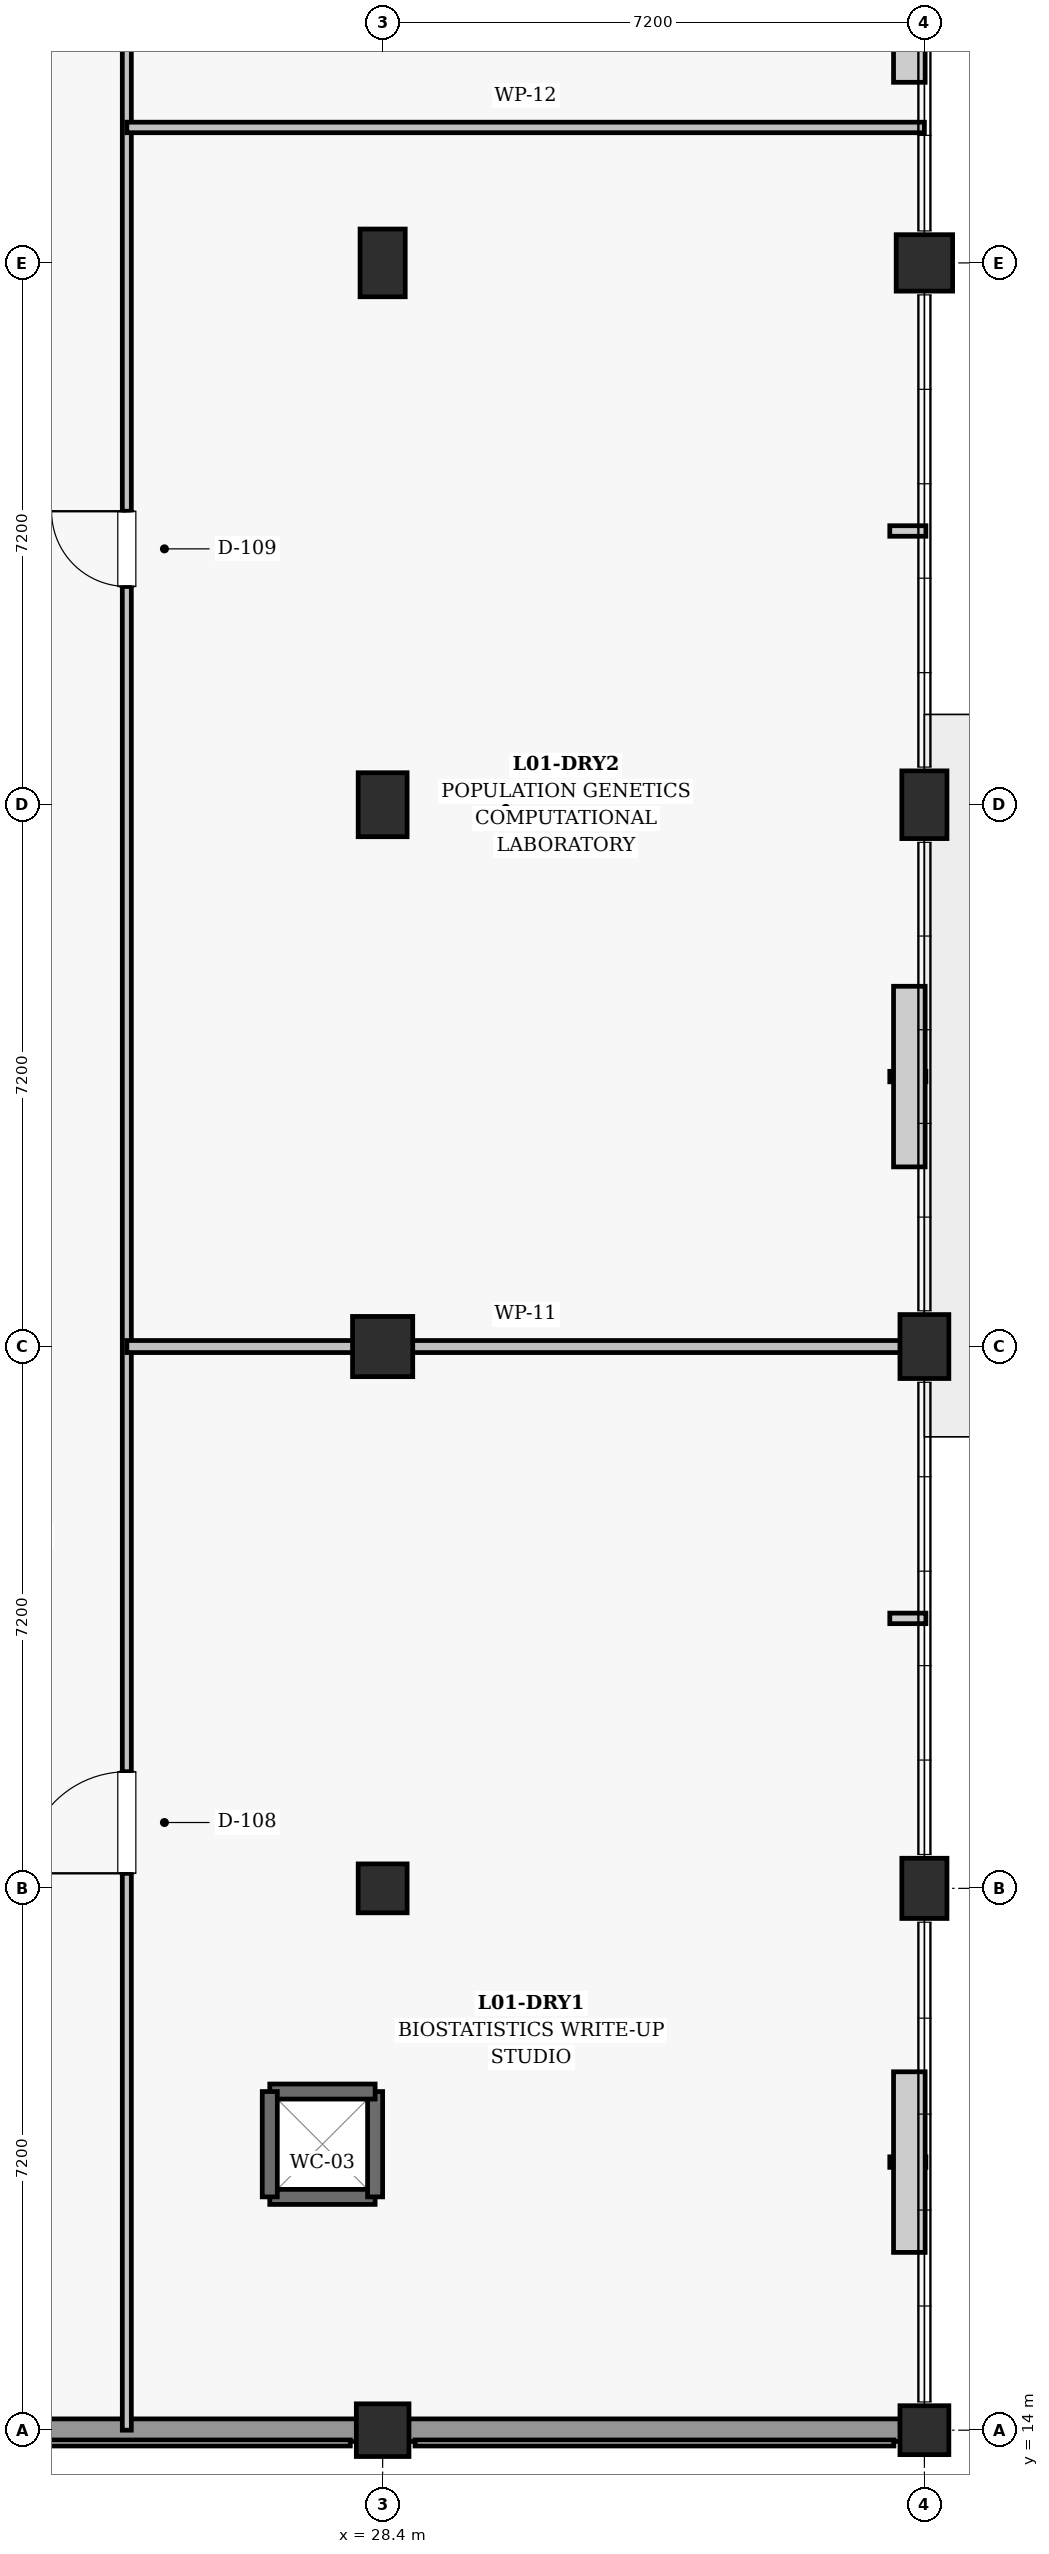
"""IFC4 building model, lengths in metres.
Left out: names, types, materials, properties, quantities, classifications, styles, units other than length and angle.
Written with IfcOpenShell. Run it as: python <this file> out.ifc"""

import sys

from ifc_helpers import new_model, si_unit, direction, frame, frame_2d, origin, origin_2d, place, context, subcontext, project, spatial, rectangle, extrude, element, fill, save


model = new_model("IFC4")
c1 = context("Model", 3, precision=1e-05, world=origin(), true_north=direction((0.0, 1.0)))
c2 = subcontext(c1, "Body", "Model", "MODEL_VIEW")
j1 = project(units=[si_unit("LENGTHUNIT", "METRE"), si_unit("PLANEANGLEUNIT", "RADIAN")], contexts=[c1])
p1 = place(None, origin())
s1 = spatial("IfcSite", under=j1, at=p1, CompositionType="ELEMENT")
p2 = place(p1, origin())
s2 = spatial("IfcBuilding", under=s1, at=p2, CompositionType="ELEMENT")
p3 = place(p2, frame((0.0, 0.0, 5.4)))
s3 = spatial("IfcBuildingStorey", under=s2, at=p3, CompositionType="ELEMENT", Elevation=5.4)
p4 = place(p3, frame((28.4, 14.0, 0.0), z_axis=(0.0, 0.0, 1.0), x_axis=(1.0, 0.0, 0.0)))
e1 = element("IfcColumn", 1, at=p4, inside=s3, PredefinedType="COLUMN", context=c2, shape_type="SweptSolid", body=[
    extrude(rectangle(XDim=0.7, YDim=0.7, at=origin_2d()), origin(), (0.0, 0.0, 1.0), 4.5),
])
p5 = place(p3, frame((28.4, 21.2, 0.0), z_axis=(0.0, 0.0, 1.0), x_axis=(1.0, 0.0, 0.0)))
e2 = element("IfcColumn", 2, at=p5, inside=s3, PredefinedType="COLUMN", context=c2, shape_type="SweptSolid", body=[
    extrude(rectangle(XDim=0.65, YDim=0.65, at=origin_2d()), origin(), (0.0, 0.0, 1.0), 4.5),
])
p6 = place(p3, frame((28.4, 28.4, 0.0), z_axis=(0.0, 0.0, 1.0), x_axis=(1.0, 0.0, 0.0)))
e3 = element("IfcColumn", 3, at=p6, inside=s3, PredefinedType="COLUMN", context=c2, shape_type="SweptSolid", body=[
    extrude(rectangle(XDim=0.8, YDim=0.8, at=origin_2d()), origin(), (0.0, 0.0, 1.0), 4.5),
])
p7 = place(p3, frame((28.4, 35.6, 0.0), z_axis=(0.0, 0.0, 1.0), x_axis=(1.0, 0.0, 0.0)))
e4 = element("IfcColumn", 4, at=p7, inside=s3, PredefinedType="COLUMN", context=c2, shape_type="SweptSolid", body=[
    extrude(rectangle(XDim=0.65, YDim=0.85, at=origin_2d()), origin(), (0.0, 0.0, 1.0), 4.5),
])
p8 = place(p3, frame((28.4, 42.8, 0.0), z_axis=(0.0, 0.0, 1.0), x_axis=(1.0, 0.0, 0.0)))
e5 = element("IfcColumn", 5, at=p8, inside=s3, PredefinedType="COLUMN", context=c2, shape_type="SweptSolid", body=[
    extrude(rectangle(XDim=0.6, YDim=0.9, at=origin_2d()), origin(), (0.0, 0.0, 1.0), 4.5),
])
p9 = place(p3, frame((35.6, 14.0, 0.0), z_axis=(0.0, 0.0, 1.0), x_axis=(1.0, 0.0, 0.0)))
e6 = element("IfcColumn", 6, at=p9, inside=s3, PredefinedType="COLUMN", context=c2, shape_type="SweptSolid", body=[
    extrude(rectangle(XDim=0.65, YDim=0.65, at=origin_2d()), origin(), (0.0, 0.0, 1.0), 4.5),
])
p10 = place(p3, frame((35.6, 21.2, 0.0), z_axis=(0.0, 0.0, 1.0), x_axis=(1.0, 0.0, 0.0)))
e7 = element("IfcColumn", 7, at=p10, inside=s3, PredefinedType="COLUMN", context=c2, shape_type="SweptSolid", body=[
    extrude(rectangle(XDim=0.6, YDim=0.8, at=origin_2d()), origin(), (0.0, 0.0, 1.0), 4.5),
])
p11 = place(p3, frame((35.6, 28.4, 0.0), z_axis=(0.0, 0.0, 1.0), x_axis=(1.0, 0.0, 0.0)))
e8 = element("IfcColumn", 8, at=p11, inside=s3, PredefinedType="COLUMN", context=c2, shape_type="SweptSolid", body=[
    extrude(rectangle(XDim=0.65, YDim=0.85, at=origin_2d()), origin(), (0.0, 0.0, 1.0), 4.5),
])
p12 = place(p3, frame((35.6, 35.6, 0.0), z_axis=(0.0, 0.0, 1.0), x_axis=(1.0, 0.0, 0.0)))
e9 = element("IfcColumn", 9, at=p12, inside=s3, PredefinedType="COLUMN", context=c2, shape_type="SweptSolid", body=[
    extrude(rectangle(XDim=0.6, YDim=0.9, at=origin_2d()), origin(), (0.0, 0.0, 1.0), 4.5),
])
p13 = place(p3, frame((35.6, 42.8, 0.0), z_axis=(0.0, 0.0, 1.0), x_axis=(1.0, 0.0, 0.0)))
e10 = element("IfcColumn", 10, at=p13, inside=s3, PredefinedType="COLUMN", context=c2, shape_type="SweptSolid", body=[
    extrude(rectangle(XDim=0.75, YDim=0.75, at=origin_2d()), origin(), (0.0, 0.0, 1.0), 4.5),
])
p14 = place(p3, frame((21.48, 14.0, 0.0), z_axis=(0.0, 0.0, 1.0), x_axis=(1.0, 0.0, 0.0)))
e11 = element("IfcWall", 11, at=p14, inside=s3, PredefinedType="SOLIDWALL", context=c2, shape_type="SweptSolid", body=[
    extrude(rectangle(XDim=6.59, YDim=0.3, at=frame_2d((3.295, 0.0))), origin(), (0.0, 0.0, 1.0), 3.475),
])
p15 = place(p3, frame((28.73, 14.0, 0.0), z_axis=(0.0, 0.0, 1.0), x_axis=(1.0, 0.0, 0.0)))
e12 = element("IfcWall", 12, at=p15, inside=s3, PredefinedType="SOLIDWALL", context=c2, shape_type="SweptSolid", body=[
    extrude(rectangle(XDim=6.565, YDim=0.3, at=frame_2d((3.282, 0.0))), origin(), (0.0, 0.0, 1.0), 3.575),
])
p16 = place(p3, frame((26.9, 17.1, 0.0), z_axis=(0.0, 0.0, 1.0), x_axis=(1.0, 0.0, 0.0)))
e13 = element("IfcWall", 13, at=p16, inside=s3, PredefinedType="SHEAR", context=c2, shape_type="SweptSolid", body=[
    extrude(rectangle(XDim=1.4, YDim=0.2, at=frame_2d((0.7, 0.0))), origin(), (0.0, 0.0, 1.0), 4.16),
])
p17 = place(p3, frame((28.3, 17.1, 0.0), z_axis=(0.0, 0.0, 1.0), x_axis=(0.0, 1.0, 0.0)))
e14 = element("IfcWall", 14, at=p17, inside=s3, PredefinedType="SHEAR", context=c2, shape_type="SweptSolid", body=[
    extrude(rectangle(XDim=1.4, YDim=0.2, at=frame_2d((0.7, 0.0))), origin(), (0.0, 0.0, 1.0), 4.16),
])
p18 = place(p3, frame((28.3, 18.5, 0.0), z_axis=(0.0, 0.0, 1.0), x_axis=(-1.0, 0.0, 0.0)))
e15 = element("IfcWall", 15, at=p18, inside=s3, PredefinedType="SHEAR", context=c2, shape_type="SweptSolid", body=[
    extrude(rectangle(XDim=1.4, YDim=0.2, at=frame_2d((0.7, 0.0))), origin(), (0.0, 0.0, 1.0), 4.16),
])
p19 = place(p3, frame((26.9, 18.5, 0.0), z_axis=(0.0, 0.0, 1.0), x_axis=(0.0, -1.0, 0.0)))
e16 = element("IfcWall", 16, at=p19, inside=s3, PredefinedType="SHEAR", context=c2, shape_type="SweptSolid", body=[
    extrude(rectangle(XDim=1.4, YDim=0.2, at=frame_2d((0.7, 0.0))), origin(), (0.0, 0.0, 1.0), 4.16),
])
p20 = place(p3, frame((25.0, 14.0, 0.0), z_axis=(0.0, 0.0, 1.0), x_axis=(0.0, 1.0, 0.0)))
e17 = element("IfcWall", 17, at=p20, inside=s3, PredefinedType="PARTITIONING", context=c2, shape_type="SweptSolid", body=[
    extrude(rectangle(XDim=88.8, YDim=0.12, at=frame_2d((44.4, 0.0))), origin(), (0.0, 0.0, 1.0), 3.38),
])
p21 = place(p20, frame((7.4, 0.0, 0.0)))
e18 = element("IfcOpeningElement", 18, at=p21, cuts=e17, PredefinedType="OPENING", context=c2, shape_type="SweptSolid", body=[
    extrude(rectangle(XDim=1.35, YDim=2.2, at=frame_2d((0.675, 1.1))), frame((0.0, 0.07, 0.0), z_axis=(0.0, -1.0, 0.0), x_axis=(1.0, 0.0, 0.0)), (0.0, 0.0, 1.0), 0.14),
])
p22 = place(p20, frame((24.5, 0.0, 0.0)))
e19 = element("IfcOpeningElement", 19, at=p22, cuts=e17, PredefinedType="OPENING", context=c2, shape_type="SweptSolid", body=[
    extrude(rectangle(XDim=1.0, YDim=2.15, at=frame_2d((0.5, 1.075))), frame((0.0, 0.07, 0.0), z_axis=(0.0, -1.0, 0.0), x_axis=(1.0, 0.0, 0.0)), (0.0, 0.0, 1.0), 0.14),
])
p23 = place(p20, frame((38.7, 0.0, 0.0)))
e20 = element("IfcOpeningElement", 20, at=p23, cuts=e17, PredefinedType="OPENING", context=c2, shape_type="SweptSolid", body=[
    extrude(rectangle(XDim=1.1, YDim=2.15, at=frame_2d((0.55, 1.075))), frame((0.0, 0.07, 0.0), z_axis=(0.0, -1.0, 0.0), x_axis=(1.0, 0.0, 0.0)), (0.0, 0.0, 1.0), 0.14),
])
p24 = place(p20, frame((55.8, 0.0, 0.0)))
e21 = element("IfcOpeningElement", 21, at=p24, cuts=e17, PredefinedType="OPENING", context=c2, shape_type="SweptSolid", body=[
    extrude(rectangle(XDim=1.18, YDim=2.2, at=frame_2d((0.59, 1.1))), frame((0.0, 0.07, 0.0), z_axis=(0.0, -1.0, 0.0), x_axis=(1.0, 0.0, 0.0)), (0.0, 0.0, 1.0), 0.14),
])
p25 = place(p20, frame((76.6, 0.0, 0.0)))
e22 = element("IfcOpeningElement", 22, at=p25, cuts=e17, PredefinedType="OPENING", context=c2, shape_type="SweptSolid", body=[
    extrude(rectangle(XDim=1.25, YDim=2.2, at=frame_2d((0.625, 1.1))), frame((0.0, 0.07, 0.0), z_axis=(0.0, -1.0, 0.0), x_axis=(1.0, 0.0, 0.0)), (0.0, 0.0, 1.0), 0.14),
])
p26 = place(p3, frame((25.0, 28.4, 0.0), z_axis=(0.0, 0.0, 1.0), x_axis=(1.0, 0.0, 0.0)))
e23 = element("IfcWall", 23, at=p26, inside=s3, PredefinedType="PARTITIONING", context=c2, shape_type="SweptSolid", body=[
    extrude(rectangle(XDim=10.6, YDim=0.16, at=frame_2d((5.3, 0.0))), origin(), (0.0, 0.0, 1.0), 3.26),
])
p27 = place(p3, frame((25.0, 44.6, 0.0), z_axis=(0.0, 0.0, 1.0), x_axis=(1.0, 0.0, 0.0)))
e24 = element("IfcWall", 24, at=p27, inside=s3, PredefinedType="PARTITIONING", context=c2, shape_type="SweptSolid", body=[
    extrude(rectangle(XDim=10.6, YDim=0.14, at=frame_2d((5.3, 0.0))), origin(), (0.0, 0.0, 1.0), 3.48),
])
p28 = place(p21, origin())
e25 = element("IfcDoor", 25, at=p28, inside=s3, OperationType="SINGLE_SWING_LEFT", PredefinedType="DOOR", context=c2, shape_type="SweptSolid", body=[
    extrude(rectangle(XDim=1.35, YDim=2.2, at=frame_2d((0.675, 1.1))), frame((0.0, 0.025, 0.0), z_axis=(0.0, -1.0, 0.0), x_axis=(1.0, 0.0, 0.0)), (0.0, 0.0, 1.0), 0.05),
])
fill(e18, e25)
p29 = place(p22, origin())
e26 = element("IfcDoor", 26, at=p29, inside=s3, OperationType="SINGLE_SWING_RIGHT", PredefinedType="DOOR", context=c2, shape_type="SweptSolid", body=[
    extrude(rectangle(XDim=1.0, YDim=2.15, at=frame_2d((0.5, 1.075))), frame((0.0, 0.025, 0.0), z_axis=(0.0, -1.0, 0.0), x_axis=(1.0, 0.0, 0.0)), (0.0, 0.0, 1.0), 0.05),
])
fill(e19, e26)
save(model, sys.argv[1])
